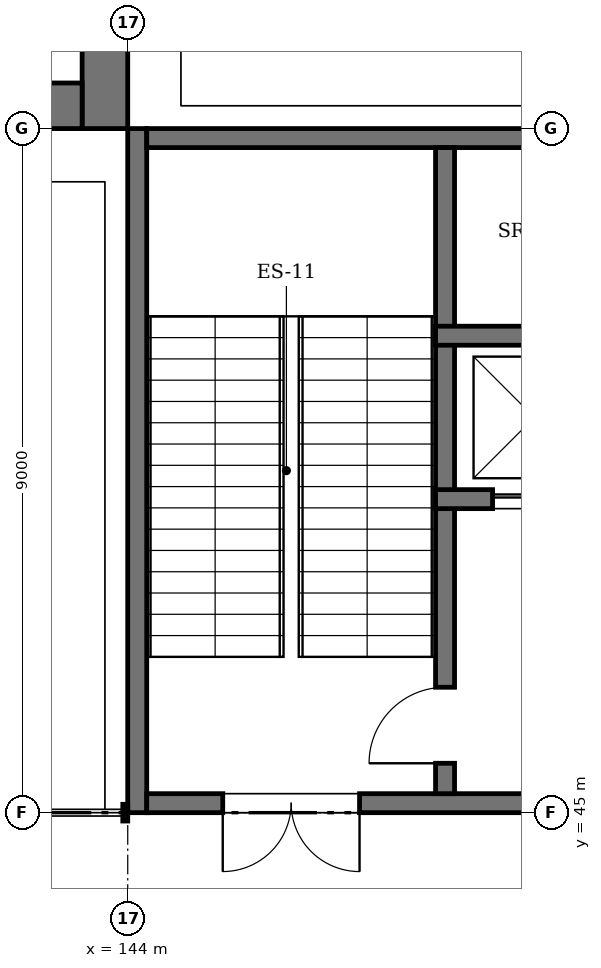
"""IFC4 building model, lengths in metres.
Left out: names, types, materials, properties, quantities, classifications, styles, units other than length and angle.
Written with IfcOpenShell. Run it as: python <this file> out.ifc"""

import sys

from ifc_helpers import new_model, si_unit, direction, frame, frame_2d, origin, place, context, subcontext, project, spatial, rectangle, extrude, element, fill, save


model = new_model("IFC4")
c1 = context("Model", 3, precision=1e-05, world=origin(), true_north=direction((0.0, 1.0)))
c2 = subcontext(c1, "Body", "Model", "MODEL_VIEW")
j1 = project(units=[si_unit("LENGTHUNIT", "METRE"), si_unit("PLANEANGLEUNIT", "RADIAN")], contexts=[c1])
p1 = place(None, origin())
s1 = spatial("IfcSite", under=j1, at=p1, CompositionType="ELEMENT")
p2 = place(p1, origin())
s2 = spatial("IfcBuilding", under=s1, at=p2, CompositionType="ELEMENT")
p3 = place(p2, origin())
s3 = spatial("IfcBuildingStorey", under=s2, at=p3, CompositionType="ELEMENT", Elevation=0.0)
p4 = place(p3, frame((144.125, 45.0, 0.0), z_axis=(0.0, 0.0, 1.0), x_axis=(0.0, 1.0, 0.0)))
e1 = element("IfcWall", 1, at=p4, inside=s3, PredefinedType="SHEAR", context=c2, shape_type="SweptSolid", body=[
    extrude(rectangle(XDim=9.0, YDim=0.25, at=frame_2d((4.5, 0.0))), origin(), (0.0, 0.0, 1.0), 6.0),
])
p5 = place(p3, frame((144.25, 45.125, 0.0), z_axis=(0.0, 0.0, 1.0), x_axis=(1.0, 0.0, 0.0)))
e2 = element("IfcWall", 2, at=p5, inside=s3, PredefinedType="SHEAR", context=c2, shape_type="SweptSolid", body=[
    extrude(rectangle(XDim=8.5, YDim=0.25, at=frame_2d((4.25, 0.0))), origin(), (0.0, 0.0, 1.0), 6.0),
])
p6 = place(p5, frame((1.0, 0.0, 0.0)))
e3 = element("IfcOpeningElement", 3, at=p6, cuts=e2, PredefinedType="OPENING", context=c2, shape_type="SweptSolid", body=[
    extrude(rectangle(XDim=1.8, YDim=2.4, at=frame_2d((0.9, 1.2))), frame((0.0, 0.135, 0.0), z_axis=(0.0, -1.0, 0.0), x_axis=(1.0, 0.0, 0.0)), (0.0, 0.0, 1.0), 0.27),
])
p7 = place(p3, frame((144.25, 53.875, 0.0), z_axis=(0.0, 0.0, 1.0), x_axis=(1.0, 0.0, 0.0)))
e4 = element("IfcWall", 4, at=p7, inside=s3, PredefinedType="SHEAR", context=c2, shape_type="SweptSolid", body=[
    extrude(rectangle(XDim=8.5, YDim=0.25, at=frame_2d((4.25, 0.0))), origin(), (0.0, 0.0, 1.0), 6.0),
])
p8 = place(p7, frame((6.95, 0.0, 0.0)))
e5 = element("IfcOpeningElement", 5, at=p8, cuts=e4, PredefinedType="OPENING", context=c2, shape_type="SweptSolid", body=[
    extrude(rectangle(XDim=1.0, YDim=2.1, at=frame_2d((0.5, 1.05))), frame((0.0, 0.135, 0.0), z_axis=(0.0, -1.0, 0.0), x_axis=(1.0, 0.0, 0.0)), (0.0, 0.0, 1.0), 0.27),
])
p9 = place(p3, frame((143.7, 54.0, 0.0), z_axis=(0.0, 0.0, 1.0), x_axis=(0.0, 1.0, 0.0)))
e6 = element("IfcWall", 6, at=p9, inside=s3, PredefinedType="SHEAR", context=c2, shape_type="SweptSolid", body=[
    extrude(rectangle(XDim=26.4, YDim=0.6, at=frame_2d((13.2, 0.0))), origin(), (0.0, 0.0, 1.0), 6.0),
])
p10 = place(p9, frame((12.3, 0.0, 0.0)))
e7 = element("IfcOpeningElement", 7, at=p10, cuts=e6, PredefinedType="OPENING", context=c2, shape_type="SweptSolid", body=[
    extrude(rectangle(XDim=2.4, YDim=2.4, at=frame_2d((1.2, 1.2))), frame((0.0, 0.31, 0.0), z_axis=(0.0, -1.0, 0.0), x_axis=(1.0, 0.0, 0.0)), (0.0, 0.0, 1.0), 0.62),
])
p11 = place(p3, frame((117.6, 54.3, 0.0), z_axis=(0.0, 0.0, 1.0), x_axis=(1.0, 0.0, 0.0)))
e8 = element("IfcWall", 8, at=p11, inside=s3, PredefinedType="SHEAR", context=c2, shape_type="SweptSolid", body=[
    extrude(rectangle(XDim=25.8, YDim=0.6, at=frame_2d((12.9, 0.0))), origin(), (0.0, 0.0, 1.0), 6.0),
])
p12 = place(p11, frame((2.8, 0.0, 0.0)))
e9 = element("IfcOpeningElement", 9, at=p12, cuts=e8, PredefinedType="OPENING", context=c2, shape_type="SweptSolid", body=[
    extrude(rectangle(XDim=2.4, YDim=2.4, at=frame_2d((1.2, 1.2))), frame((0.0, 0.31, 0.0), z_axis=(0.0, -1.0, 0.0), x_axis=(1.0, 0.0, 0.0)), (0.0, 0.0, 1.0), 0.62),
])
p13 = place(p11, frame((11.7, 0.0, 0.0)))
e10 = element("IfcOpeningElement", 10, at=p13, cuts=e8, PredefinedType="OPENING", context=c2, shape_type="SweptSolid", body=[
    extrude(rectangle(XDim=2.4, YDim=2.4, at=frame_2d((1.2, 1.2))), frame((0.0, 0.31, 0.0), z_axis=(0.0, -1.0, 0.0), x_axis=(1.0, 0.0, 0.0)), (0.0, 0.0, 1.0), 0.62),
])
p14 = place(p11, frame((20.6, 0.0, 0.0)))
e11 = element("IfcOpeningElement", 11, at=p14, cuts=e8, PredefinedType="OPENING", context=c2, shape_type="SweptSolid", body=[
    extrude(rectangle(XDim=2.4, YDim=2.4, at=frame_2d((1.2, 1.2))), frame((0.0, 0.31, 0.0), z_axis=(0.0, -1.0, 0.0), x_axis=(1.0, 0.0, 0.0)), (0.0, 0.0, 1.0), 0.62),
])
p15 = place(p3, frame((148.175, 45.25, 0.0), z_axis=(0.0, 0.0, 1.0), x_axis=(0.0, 1.0, 0.0)))
e12 = element("IfcWall", 12, at=p15, inside=s3, PredefinedType="SOLIDWALL", context=c2, shape_type="SweptSolid", body=[
    extrude(rectangle(XDim=8.5, YDim=0.25, at=frame_2d((4.25, 0.0))), origin(), (0.0, 0.0, 1.0), 5.75),
])
p16 = place(p15, frame((0.4, 0.0, 0.0)))
e13 = element("IfcOpeningElement", 13, at=p16, cuts=e12, PredefinedType="OPENING", context=c2, shape_type="SweptSolid", body=[
    extrude(rectangle(XDim=1.0, YDim=2.1, at=frame_2d((0.5, 1.05))), frame((0.0, 0.135, 0.0), z_axis=(0.0, -1.0, 0.0), x_axis=(1.0, 0.0, 0.0)), (0.0, 0.0, 1.0), 0.27),
])
p17 = place(p3, frame((148.05, 49.125, -1.4), z_axis=(0.0, 0.0, 1.0), x_axis=(1.0, 0.0, 0.0)))
e14 = element("IfcWall", 14, at=p17, inside=s3, PredefinedType="SOLIDWALL", context=c2, shape_type="SweptSolid", body=[
    extrude(rectangle(XDim=2.6, YDim=0.25, at=frame_2d((1.3, 0.0))), origin(), (0.0, 0.0, 1.0), 7.4),
])
p18 = place(p17, frame((0.75, 0.0, 1.4)))
e15 = element("IfcOpeningElement", 15, at=p18, cuts=e14, PredefinedType="OPENING", context=c2, shape_type="SweptSolid", body=[
    extrude(rectangle(XDim=1.1, YDim=2.1, at=frame_2d((0.55, 1.05))), frame((0.0, 0.135, 0.0), z_axis=(0.0, -1.0, 0.0), x_axis=(1.0, 0.0, 0.0)), (0.0, 0.0, 1.0), 0.27),
])
p19 = place(p3, frame((148.05, 51.275, -1.4), z_axis=(0.0, 0.0, 1.0), x_axis=(1.0, 0.0, 0.0)))
e16 = element("IfcWall", 16, at=p19, inside=s3, PredefinedType="SOLIDWALL", context=c2, shape_type="SweptSolid", body=[
    extrude(rectangle(XDim=2.6, YDim=0.25, at=frame_2d((1.3, 0.0))), origin(), (0.0, 0.0, 1.0), 7.4),
])
p20 = place(p6, frame((1.8, 0.0, 0.0), z_axis=(0.0, 0.0, 1.0), x_axis=(-1.0, 0.0, 0.0)))
e17 = element("IfcDoor", 17, at=p20, inside=s3, OperationType="DOUBLE_DOOR_SINGLE_SWING", PredefinedType="DOOR", context=c2, shape_type="SweptSolid", body=[
    extrude(rectangle(XDim=1.8, YDim=2.4, at=frame_2d((0.9, 1.2))), frame((0.0, 0.025, 0.0), z_axis=(0.0, -1.0, 0.0), x_axis=(1.0, 0.0, 0.0)), (0.0, 0.0, 1.0), 0.05),
])
fill(e3, e17)
p21 = place(p18, origin())
e18 = element("IfcDoor", 18, at=p21, inside=s3, OperationType="DOUBLE_DOOR_SLIDING", PredefinedType="DOOR", context=c2, shape_type="SweptSolid", body=[
    extrude(rectangle(XDim=1.1, YDim=2.1, at=frame_2d((0.55, 1.05))), frame((0.0, 0.025, 0.0), z_axis=(0.0, -1.0, 0.0), x_axis=(1.0, 0.0, 0.0)), (0.0, 0.0, 1.0), 0.05),
])
fill(e15, e18)
p22 = place(p16, origin())
e19 = element("IfcDoor", 19, at=p22, inside=s3, OperationType="SINGLE_SWING_LEFT", PredefinedType="DOOR", context=c2, shape_type="SweptSolid", body=[
    extrude(rectangle(XDim=1.0, YDim=2.1, at=frame_2d((0.5, 1.05))), frame((0.0, 0.025, 0.0), z_axis=(0.0, -1.0, 0.0), x_axis=(1.0, 0.0, 0.0)), (0.0, 0.0, 1.0), 0.05),
])
fill(e13, e19)
save(model, sys.argv[1])
